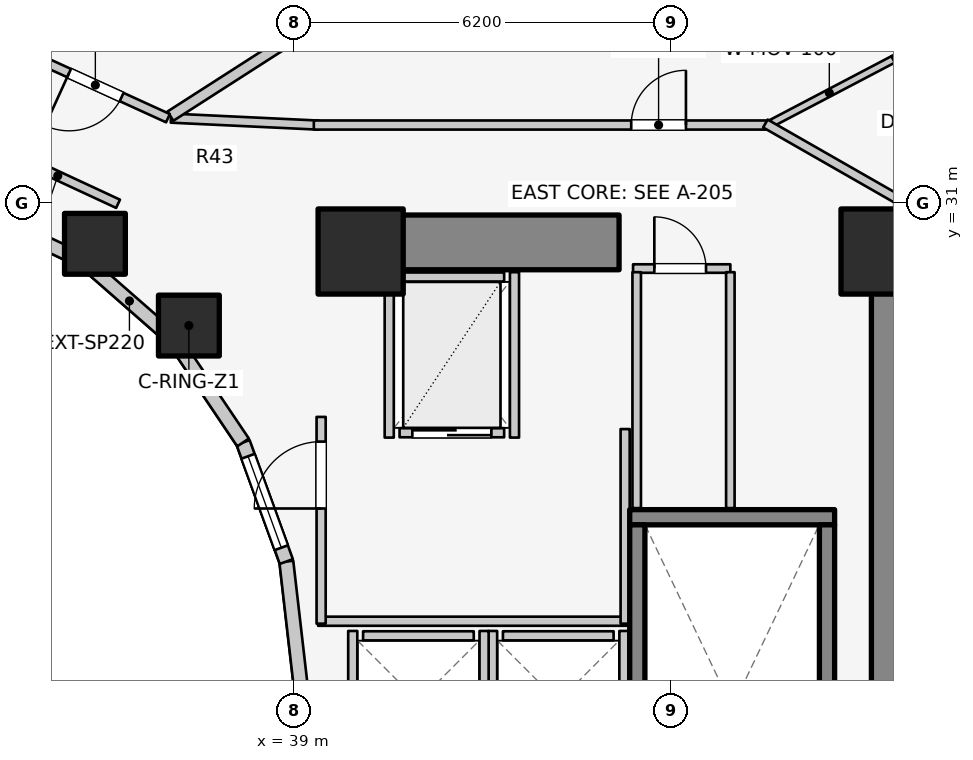
"""IFC4 building model, lengths in metres.
Left out: names, types, materials, properties, quantities, classifications, styles, units other than length and angle.
Written with IfcOpenShell. Run it as: python <this file> out.ifc"""

import sys

from ifc_helpers import new_model, si_unit, direction, frame, frame_2d, origin, origin_2d, place, context, subcontext, project, spatial, rectangle, extrude, element, fill, save


model = new_model("IFC4")
c1 = context("Model", 3, precision=1e-05, world=origin(), true_north=direction((0.0, 1.0)))
c2 = subcontext(c1, "Body", "Model", "MODEL_VIEW")
j1 = project(units=[si_unit("LENGTHUNIT", "METRE"), si_unit("PLANEANGLEUNIT", "RADIAN")], contexts=[c1])
p1 = place(None, origin())
s1 = spatial("IfcSite", under=j1, at=p1, CompositionType="ELEMENT")
p2 = place(p1, origin())
s2 = spatial("IfcBuilding", under=s1, at=p2, CompositionType="ELEMENT")
p3 = place(p2, frame((0.0, 0.0, 55.5)))
s3 = spatial("IfcBuildingStorey", under=s2, at=p3, CompositionType="ELEMENT", Elevation=55.5)
p4 = place(p3, frame((48.95, 17.05, 0.0), z_axis=(0.0, 0.0, 1.0), x_axis=(0.0, 1.0, 0.0)))
e1 = element("IfcWall", 1, at=p4, inside=s3, PredefinedType="SHEAR", context=c2, shape_type="SweptSolid", body=[
    extrude(rectangle(XDim=12.8, YDim=0.9, at=frame_2d((6.4, 0.0))), origin(), (0.0, 0.0, 1.0), 3.1),
])
p5 = place(p3, frame((39.85, 30.35, 0.0), z_axis=(0.0, 0.0, 1.0), x_axis=(1.0, 0.0, 0.0)))
e2 = element("IfcWall", 2, at=p5, inside=s3, PredefinedType="SHEAR", context=c2, shape_type="SweptSolid", body=[
    extrude(rectangle(XDim=4.5, YDim=0.9, at=frame_2d((2.25, 0.0))), origin(), (0.0, 0.0, 1.0), 3.1),
])
p6 = place(p3, frame((44.525, 25.83, 0.0), z_axis=(0.0, 0.0, 1.0), x_axis=(1.0, 0.0, 0.0)))
e3 = element("IfcWall", 3, at=p6, inside=s3, PredefinedType="SOLIDWALL", context=c2, shape_type="SweptSolid", body=[
    extrude(rectangle(XDim=3.37, YDim=0.25, at=frame_2d((1.685, 0.0))), origin(), (0.0, 0.0, 1.0), 3.1),
])
for number, where, z_axis, x_axis in (
    (4, (44.65, 17.895, 0.0), (0.0, 0.0, 1.0), (0.0, 1.0, 0.0)),
    (5, (47.77, 17.895, 0.0), (0.0, 0.0, 1.0), (0.0, 1.0, 0.0)),
):
    element("IfcWall", number, at=place(p3, frame(where, z_axis=z_axis, x_axis=x_axis)), inside=s3, PredefinedType="SOLIDWALL", context=c2, shape_type="SweptSolid", body=[
        extrude(rectangle(XDim=7.81, YDim=0.25, at=frame_2d((3.905, 0.0))), origin(), (0.0, 0.0, 1.0), 3.1),
    ])
for number, where, z_axis, x_axis in (
    (6, (48.7, 30.2, 0.0), (0.0, 0.0, 1.0), (1.0, 0.0, 0.0)),
    (7, (40.1, 30.2, 0.0), (0.0, 0.0, 1.0), (1.0, 0.0, 0.0)),
):
    element("IfcColumn", number, at=place(p3, frame(where, z_axis=z_axis, x_axis=x_axis)), inside=s3, PredefinedType="COLUMN", context=c2, shape_type="SweptSolid", body=[
        extrude(rectangle(XDim=1.4, YDim=1.4, at=origin_2d()), origin(), (0.0, 0.0, 1.0), 3.1),
    ])
for number, where, z_axis, x_axis in (
    (8, (37.275, 28.982, 0.0), (0.0, 0.0, 1.0), (1.0, 0.0, 0.0)),
    (9, (35.73, 30.327, 0.0), (0.0, 0.0, 1.0), (1.0, 0.0, 0.0)),
):
    element("IfcColumn", number, at=place(p3, frame(where, z_axis=z_axis, x_axis=x_axis)), inside=s3, PredefinedType="COLUMN", context=c2, shape_type="SweptSolid", body=[
        extrude(rectangle(XDim=1.0, YDim=1.0, at=origin_2d()), origin(), (0.0, 0.0, 1.0), 3.1),
    ])
p7 = place(p3, frame((39.12, 23.0, 0.0), z_axis=(0.0, 0.0, 1.0), x_axis=(-0.114711713601, 0.993398823617, 0.0)))
e10 = element("IfcWall", 10, at=p7, inside=s3, PredefinedType="STANDARD", context=c2, shape_type="SweptSolid", body=[
    extrude(rectangle(XDim=2.115, YDim=0.23, at=frame_2d((1.058, 0.0))), origin(), (0.0, 0.0, 1.0), 2.84),
])
p8 = place(p3, frame((38.877, 25.102, 0.0), z_axis=(0.0, 0.0, 1.0), x_axis=(-0.341423187295, 0.93990968033, 0.0)))
e11 = element("IfcWall", 11, at=p8, inside=s3, PredefinedType="STANDARD", context=c2, shape_type="SweptSolid", body=[
    extrude(rectangle(XDim=2.084, YDim=0.23, at=frame_2d((1.042, 0.0))), origin(), (0.0, 0.0, 1.0), 2.84),
])
p9 = place(p8, frame((0.242, 0.0, 0.85)))
e12 = element("IfcOpeningElement", 12, at=p9, cuts=e11, PredefinedType="OPENING", context=c2, shape_type="SweptSolid", body=[
    extrude(rectangle(XDim=1.6, YDim=1.65, at=frame_2d((0.8, 0.825))), frame((0.0, 0.125, 0.0), z_axis=(0.0, -1.0, 0.0), x_axis=(1.0, 0.0, 0.0)), (0.0, 0.0, 1.0), 0.25),
])
p10 = place(p3, frame((38.166, 27.06, 0.0), z_axis=(0.0, 0.0, 1.0), x_axis=(-0.558197800898, 0.829707909492, 0.0)))
e13 = element("IfcWall", 13, at=p10, inside=s3, PredefinedType="STANDARD", context=c2, shape_type="SweptSolid", body=[
    extrude(rectangle(XDim=2.027, YDim=0.23, at=frame_2d((1.013, 0.0))), origin(), (0.0, 0.0, 1.0), 2.16),
])
p11 = place(p3, frame((37.035, 28.742, 0.0), z_axis=(0.0, 0.0, 1.0), x_axis=(-0.752576694707, 0.658504607869, 0.0)))
e14 = element("IfcWall", 14, at=p11, inside=s3, PredefinedType="STANDARD", context=c2, shape_type="SweptSolid", body=[
    extrude(rectangle(XDim=1.959, YDim=0.23, at=frame_2d((0.98, 0.0))), origin(), (0.0, 0.0, 1.0), 2.16),
])
p12 = place(p3, frame((35.56, 30.032, 0.0), z_axis=(0.0, 0.0, 1.0), x_axis=(-0.904179699603, 0.427152280606, 0.0)))
e15 = element("IfcWall", 15, at=p12, inside=s3, PredefinedType="STANDARD", context=c2, shape_type="SweptSolid", body=[
    extrude(rectangle(XDim=1.899, YDim=0.23, at=frame_2d((0.95, 0.0))), origin(), (0.0, 0.0, 1.0), 2.16),
])
p13 = place(p3, frame((42.44, 23.88, 0.0), z_axis=(0.0, 0.0, 1.0), x_axis=(1.0, 0.0, 0.0)))
e16 = element("IfcWall", 16, at=p13, inside=s3, PredefinedType="SOLIDWALL", context=c2, shape_type="SweptSolid", body=[
    extrude(rectangle(XDim=1.82, YDim=0.15, at=frame_2d((0.91, 0.0))), origin(), (0.0, 0.0, 1.0), 2.855),
])
for number, where, z_axis, x_axis in (
    (17, (42.27, 21.64, 0.0), (0.0, 0.0, 1.0), (0.0, 1.0, 0.0)),
    (18, (44.43, 21.64, 0.0), (0.0, 0.0, 1.0), (0.0, 1.0, 0.0)),
):
    element("IfcWall", number, at=place(p3, frame(where, z_axis=z_axis, x_axis=x_axis)), inside=s3, PredefinedType="SOLIDWALL", context=c2, shape_type="SweptSolid", body=[
        extrude(rectangle(XDim=2.32, YDim=0.15, at=frame_2d((1.16, 0.0))), origin(), (0.0, 0.0, 1.0), 2.855),
    ])
p14 = place(p3, frame((40.14, 23.88, 0.0), z_axis=(0.0, 0.0, 1.0), x_axis=(1.0, 0.0, 0.0)))
e19 = element("IfcWall", 19, at=p14, inside=s3, PredefinedType="SOLIDWALL", context=c2, shape_type="SweptSolid", body=[
    extrude(rectangle(XDim=1.82, YDim=0.15, at=frame_2d((0.91, 0.0))), origin(), (0.0, 0.0, 1.0), 2.12),
])
p15 = place(p3, frame((39.97, 21.64, 0.0), z_axis=(0.0, 0.0, 1.0), x_axis=(0.0, 1.0, 0.0)))
e20 = element("IfcWall", 20, at=p15, inside=s3, PredefinedType="SOLIDWALL", context=c2, shape_type="SweptSolid", body=[
    extrude(rectangle(XDim=2.32, YDim=0.15, at=frame_2d((1.16, 0.0))), origin(), (0.0, 0.0, 1.0), 2.12),
])
p16 = place(p3, frame((42.13, 21.64, 0.0), z_axis=(0.0, 0.0, 1.0), x_axis=(0.0, 1.0, 0.0)))
e21 = element("IfcWall", 21, at=p16, inside=s3, PredefinedType="SOLIDWALL", context=c2, shape_type="SweptSolid", body=[
    extrude(rectangle(XDim=2.32, YDim=0.15, at=frame_2d((1.16, 0.0))), origin(), (0.0, 0.0, 1.0), 2.855),
])
p17 = place(p3, frame((40.74, 27.22, 0.0), z_axis=(0.0, 0.0, 1.0), x_axis=(1.0, 0.0, 0.0)))
e22 = element("IfcWall", 22, at=p17, inside=s3, PredefinedType="SOLIDWALL", context=c2, shape_type="SweptSolid", body=[
    extrude(rectangle(XDim=1.72, YDim=0.15, at=frame_2d((0.86, 0.0))), origin(), (0.0, 0.0, 1.0), 2.855),
])
p18 = place(p17, frame((0.21, 0.0, 0.0)))
e23 = element("IfcOpeningElement", 23, at=p18, cuts=e22, PredefinedType="OPENING", context=c2, shape_type="SweptSolid", body=[
    extrude(rectangle(XDim=1.3, YDim=2.1, at=frame_2d((0.65, 1.05))), frame((0.0, 0.085, 0.0), z_axis=(0.0, -1.0, 0.0), x_axis=(1.0, 0.0, 0.0)), (0.0, 0.0, 1.0), 0.17),
])
p19 = place(p3, frame((40.74, 29.78, 0.0), z_axis=(0.0, 0.0, 1.0), x_axis=(1.0, 0.0, 0.0)))
e24 = element("IfcWall", 24, at=p19, inside=s3, PredefinedType="SOLIDWALL", context=c2, shape_type="SweptSolid", body=[
    extrude(rectangle(XDim=1.72, YDim=0.15, at=frame_2d((0.86, 0.0))), origin(), (0.0, 0.0, 1.0), 2.855),
])
for number, where, z_axis, x_axis in (
    (25, (40.57, 27.14, 0.0), (0.0, 0.0, 1.0), (0.0, 1.0, 0.0)),
    (26, (42.63, 27.14, 0.0), (0.0, 0.0, 1.0), (0.0, 1.0, 0.0)),
):
    element("IfcWall", number, at=place(p3, frame(where, z_axis=z_axis, x_axis=x_axis)), inside=s3, PredefinedType="SOLIDWALL", context=c2, shape_type="SweptSolid", body=[
        extrude(rectangle(XDim=2.72, YDim=0.15, at=frame_2d((1.36, 0.0))), origin(), (0.0, 0.0, 1.0), 2.855),
    ])
p20 = place(p3, frame((39.4, 24.12, 0.0), z_axis=(0.0, 0.0, 1.0), x_axis=(1.0, 0.0, 0.0)))
e27 = element("IfcWall", 27, at=p20, inside=s3, PredefinedType="PARTITIONING", context=c2, shape_type="SweptSolid", body=[
    extrude(rectangle(XDim=5.08, YDim=0.15, at=frame_2d((2.54, 0.0))), origin(), (0.0, 0.0, 1.0), 2.12),
])
p21 = place(p3, frame((44.45, 24.08, 0.0), z_axis=(0.0, 0.0, 1.0), x_axis=(0.0, 1.0, 0.0)))
e28 = element("IfcWall", 28, at=p21, inside=s3, PredefinedType="PARTITIONING", context=c2, shape_type="SweptSolid", body=[
    extrude(rectangle(XDim=3.2, YDim=0.15, at=frame_2d((1.6, 0.0))), origin(), (0.0, 0.0, 1.0), 2.855),
])
p22 = place(p3, frame((39.45, 24.08, 0.0), z_axis=(0.0, 0.0, 1.0), x_axis=(0.0, 1.0, 0.0)))
e29 = element("IfcWall", 29, at=p22, inside=s3, PredefinedType="PARTITIONING", context=c2, shape_type="SweptSolid", body=[
    extrude(rectangle(XDim=3.4, YDim=0.15, at=frame_2d((1.7, 0.0))), origin(), (0.0, 0.0, 1.0), 2.855),
])
p23 = place(p22, frame((1.894, 0.0, 0.0)))
e30 = element("IfcOpeningElement", 30, at=p23, cuts=e29, PredefinedType="OPENING", context=c2, shape_type="SweptSolid", body=[
    extrude(rectangle(XDim=1.1, YDim=2.1, at=frame_2d((0.55, 1.05))), frame((0.0, 0.085, 0.0), z_axis=(0.0, -1.0, 0.0), x_axis=(1.0, 0.0, 0.0)), (0.0, 0.0, 1.0), 0.17),
])
p24 = place(p3, frame((44.58, 29.92, 0.0), z_axis=(0.0, 0.0, 1.0), x_axis=(1.0, 0.0, 0.0)))
e31 = element("IfcWall", 31, at=p24, inside=s3, PredefinedType="PLUMBINGWALL", context=c2, shape_type="SweptSolid", body=[
    extrude(rectangle(XDim=1.6, YDim=0.14, at=frame_2d((0.8, 0.0))), origin(), (0.0, 0.0, 1.0), 2.855),
])
p25 = place(p24, frame((0.35, 0.0, 0.0)))
e32 = element("IfcOpeningElement", 32, at=p25, cuts=e31, PredefinedType="OPENING", context=c2, shape_type="SweptSolid", body=[
    extrude(rectangle(XDim=0.85, YDim=2.05, at=frame_2d((0.425, 1.025))), frame((0.0, 0.08, 0.0), z_axis=(0.0, -1.0, 0.0), x_axis=(1.0, 0.0, 0.0)), (0.0, 0.0, 1.0), 0.16),
])
for number, where, z_axis, x_axis in (
    (33, (44.64, 25.98, 0.0), (0.0, 0.0, 1.0), (0.0, 1.0, 0.0)),
    (34, (46.18, 25.98, 0.0), (0.0, 0.0, 1.0), (0.0, 1.0, 0.0)),
):
    element("IfcWall", number, at=place(p3, frame(where, z_axis=z_axis, x_axis=x_axis)), inside=s3, PredefinedType="PLUMBINGWALL", context=c2, shape_type="SweptSolid", body=[
        extrude(rectangle(XDim=3.88, YDim=0.14, at=frame_2d((1.94, 0.0))), origin(), (0.0, 0.0, 1.0), 2.855),
    ])
p26 = place(p3, frame((36.11, 30.985, 0.0), z_axis=(0.0, 0.0, 1.0), x_axis=(-0.906943449489, 0.421252393975, 0.0)))
e35 = element("IfcWall", 35, at=p26, inside=s3, PredefinedType="PARTITIONING", context=c2, shape_type="SweptSolid", body=[
    extrude(rectangle(XDim=2.186, YDim=0.15, at=frame_2d((1.093, 0.0))), origin(), (0.0, 0.0, 1.0), 2.237),
])
p27 = place(p3, frame((46.756, 32.257, 0.0), z_axis=(0.0, 0.0, 1.0), x_axis=(0.885586030676, 0.464475383924, 0.0)))
e36 = element("IfcWall", 36, at=p27, inside=s3, PredefinedType="MOVABLE", context=c2, shape_type="SweptSolid", body=[
    extrude(rectangle(XDim=2.376, YDim=0.12, at=frame_2d((1.188, 0.0))), origin(), (0.0, 0.0, 1.0), 2.855),
])
p28 = place(p3, frame((48.86, 33.36, 0.0), z_axis=(0.0, 0.0, 1.0), x_axis=(0.885447282698, 0.464739829972, 0.0)))
e37 = element("IfcWall", 37, at=p28, inside=s3, PredefinedType="MOVABLE", context=c2, shape_type="SweptSolid", body=[
    extrude(rectangle(XDim=1.17, YDim=0.12, at=frame_2d((0.585, 0.0))), origin(), (0.0, 0.0, 1.0), 2.11),
])
p29 = place(p28, frame((0.16, 0.0, 0.0)))
e38 = element("IfcOpeningElement", 38, at=p29, cuts=e37, PredefinedType="OPENING", context=c2, shape_type="SweptSolid", body=[
    extrude(rectangle(XDim=0.85, YDim=2.05, at=frame_2d((0.425, 1.025))), frame((0.0, 0.07, 0.0), z_axis=(0.0, -1.0, 0.0), x_axis=(1.0, 0.0, 0.0)), (0.0, 0.0, 1.0), 0.14),
])
p30 = place(p3, frame((36.98, 32.394, 0.0), z_axis=(0.0, 0.0, 1.0), x_axis=(0.998877427952, -0.047369651964, 0.0)))
e39 = element("IfcWall", 39, at=p30, inside=s3, PredefinedType="PARTITIONING", context=c2, shape_type="SweptSolid", body=[
    extrude(rectangle(XDim=2.433, YDim=0.15, at=frame_2d((1.216, 0.0))), origin(), (0.0, 0.0, 1.0), 2.237),
])
p31 = place(p3, frame((39.33, 32.28, 0.0), z_axis=(0.0, 0.0, 1.0), x_axis=(1.0, 0.0, 0.0)))
e40 = element("IfcWall", 40, at=p31, inside=s3, PredefinedType="PARTITIONING", context=c2, shape_type="SweptSolid", body=[
    extrude(rectangle(XDim=7.52, YDim=0.15, at=frame_2d((3.76, 0.0))), origin(), (0.0, 0.0, 1.0), 2.237),
])
p32 = place(p31, frame((5.22, 0.0, 0.0)))
e41 = element("IfcOpeningElement", 41, at=p32, cuts=e40, PredefinedType="OPENING", context=c2, shape_type="SweptSolid", body=[
    extrude(rectangle(XDim=0.9, YDim=2.1, at=frame_2d((0.45, 1.05))), frame((0.0, 0.085, 0.0), z_axis=(0.0, -1.0, 0.0), x_axis=(1.0, 0.0, 0.0)), (0.0, 0.0, 1.0), 0.17),
])
p33 = place(p3, frame((46.757, 32.305, 0.0), z_axis=(0.0, 0.0, 1.0), x_axis=(0.867991349648, -0.496579315857, 0.0)))
e42 = element("IfcWall", 42, at=p33, inside=s3, PredefinedType="PARTITIONING", context=c2, shape_type="SweptSolid", body=[
    extrude(rectangle(XDim=2.567, YDim=0.15, at=frame_2d((1.283, 0.0))), origin(), (0.0, 0.0, 1.0), 2.069),
])
p34 = place(p3, frame((36.971, 32.426, 0.0), z_axis=(0.0, 0.0, 1.0), x_axis=(0.841689919529, 0.5399611832, 0.0)))
e43 = element("IfcWall", 43, at=p34, inside=s3, PredefinedType="PARTITIONING", context=c2, shape_type="SweptSolid", body=[
    extrude(rectangle(XDim=10.058, YDim=0.18, at=frame_2d((5.029, 0.0))), origin(), (0.0, 0.0, 1.0), 2.237),
])
p35 = place(p3, frame((34.586, 33.521, 0.0), z_axis=(0.0, 0.0, 1.0), x_axis=(0.675465011224, 0.737392038615, 0.0)))
e44 = element("IfcWall", 44, at=p35, inside=s3, PredefinedType="PARTITIONING", context=c2, shape_type="SweptSolid", body=[
    extrude(rectangle(XDim=8.007, YDim=0.18, at=frame_2d((4.003, 0.0))), origin(), (0.0, 0.0, 1.0), 2.237),
])
p36 = place(p3, frame((36.931, 32.393, 0.0), z_axis=(0.0, 0.0, 1.0), x_axis=(-0.909747571199, 0.415161843982, 0.0)))
e45 = element("IfcWall", 45, at=p36, inside=s3, PredefinedType="PARTITIONING", context=c2, shape_type="SweptSolid", body=[
    extrude(rectangle(XDim=2.625, YDim=0.15, at=frame_2d((1.312, 0.0))), origin(), (0.0, 0.0, 1.0), 2.237),
])
p37 = place(p36, frame((0.838, 0.0, 0.0)))
e46 = element("IfcOpeningElement", 46, at=p37, cuts=e45, PredefinedType="OPENING", context=c2, shape_type="SweptSolid", body=[
    extrude(rectangle(XDim=0.95, YDim=2.1, at=frame_2d((0.475, 1.05))), frame((0.0, 0.085, 0.0), z_axis=(0.0, -1.0, 0.0), x_axis=(1.0, 0.0, 0.0)), (0.0, 0.0, 1.0), 0.17),
])
p38 = place(p9, origin())
e47 = element("IfcWindow", 47, at=p38, inside=s3, PartitioningType="SINGLE_PANEL", PredefinedType="WINDOW", context=c2, shape_type="SweptSolid", body=[
    extrude(rectangle(XDim=1.6, YDim=1.65, at=frame_2d((0.8, 0.825))), frame((0.0, 0.03, 0.0), z_axis=(0.0, -1.0, 0.0), x_axis=(1.0, 0.0, 0.0)), (0.0, 0.0, 1.0), 0.06),
])
fill(e12, e47)
p39 = place(p18, origin())
e48 = element("IfcDoor", 48, at=p39, inside=s3, OperationType="DOUBLE_DOOR_SLIDING", PredefinedType="DOOR", context=c2, shape_type="SweptSolid", body=[
    extrude(rectangle(XDim=1.3, YDim=2.1, at=frame_2d((0.65, 1.05))), frame((0.0, 0.025, 0.0), z_axis=(0.0, -1.0, 0.0), x_axis=(1.0, 0.0, 0.0)), (0.0, 0.0, 1.0), 0.05),
])
fill(e23, e48)
p40 = place(p23, origin())
e49 = element("IfcDoor", 49, at=p40, inside=s3, OperationType="SINGLE_SWING_LEFT", PredefinedType="DOOR", context=c2, shape_type="SweptSolid", body=[
    extrude(rectangle(XDim=1.1, YDim=2.1, at=frame_2d((0.55, 1.05))), frame((0.0, 0.025, 0.0), z_axis=(0.0, -1.0, 0.0), x_axis=(1.0, 0.0, 0.0)), (0.0, 0.0, 1.0), 0.05),
])
fill(e30, e49)
p41 = place(p25, origin())
e50 = element("IfcDoor", 50, at=p41, inside=s3, OperationType="SINGLE_SWING_LEFT", PredefinedType="DOOR", context=c2, shape_type="SweptSolid", body=[
    extrude(rectangle(XDim=0.85, YDim=2.05, at=frame_2d((0.425, 1.025))), frame((0.0, 0.025, 0.0), z_axis=(0.0, -1.0, 0.0), x_axis=(1.0, 0.0, 0.0)), (0.0, 0.0, 1.0), 0.05),
])
fill(e32, e50)
p42 = place(p32, origin())
e51 = element("IfcDoor", 51, at=p42, inside=s3, OperationType="SINGLE_SWING_RIGHT", PredefinedType="DOOR", context=c2, shape_type="SweptSolid", body=[
    extrude(rectangle(XDim=0.9, YDim=2.1, at=frame_2d((0.45, 1.05))), frame((0.0, 0.025, 0.0), z_axis=(0.0, -1.0, 0.0), x_axis=(1.0, 0.0, 0.0)), (0.0, 0.0, 1.0), 0.05),
])
fill(e41, e51)
p43 = place(p37, origin())
e52 = element("IfcDoor", 52, at=p43, inside=s3, OperationType="SINGLE_SWING_RIGHT", PredefinedType="DOOR", context=c2, shape_type="SweptSolid", body=[
    extrude(rectangle(XDim=0.95, YDim=2.1, at=frame_2d((0.475, 1.05))), frame((0.0, 0.025, 0.0), z_axis=(0.0, -1.0, 0.0), x_axis=(1.0, 0.0, 0.0)), (0.0, 0.0, 1.0), 0.05),
])
fill(e46, e52)
save(model, sys.argv[1])
